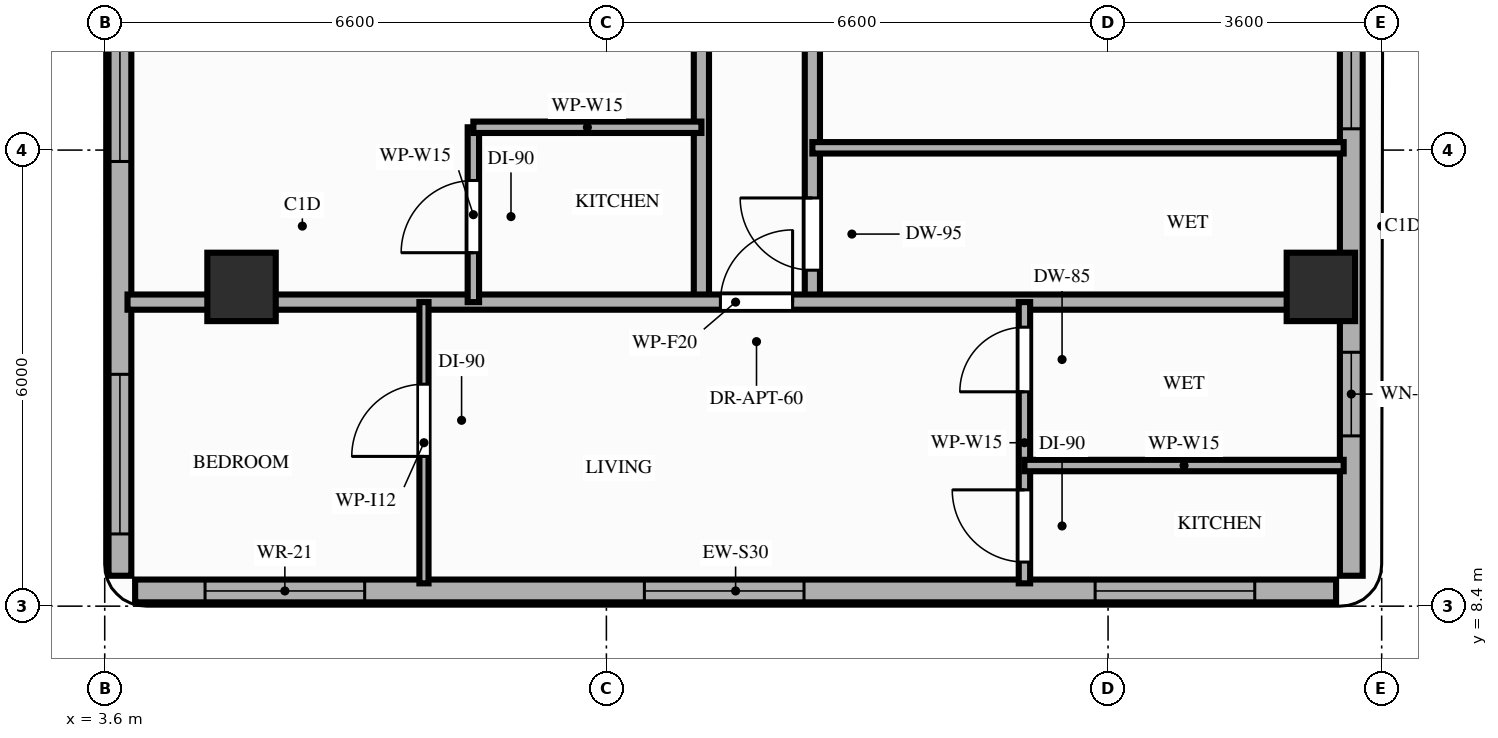
"""IFC4 building model, lengths in metres.
Left out: names, types, materials, properties, quantities, classifications, styles, units other than length and angle.
Written with IfcOpenShell. Run it as: python <this file> out.ifc"""

import sys

from ifc_helpers import new_model, si_unit, direction, frame, frame_2d, origin, origin_2d, place, context, subcontext, project, spatial, rectangle, extrude, element, fill, save


model = new_model("IFC4")
c1 = context("Model", 3, precision=1e-05, world=origin(), true_north=direction((0.0, 1.0)))
c2 = subcontext(c1, "Body", "Model", "MODEL_VIEW")
j1 = project(units=[si_unit("LENGTHUNIT", "METRE"), si_unit("PLANEANGLEUNIT", "RADIAN")], contexts=[c1])
p1 = place(None, origin())
s1 = spatial("IfcSite", under=j1, at=p1, CompositionType="ELEMENT")
p2 = place(p1, origin())
s2 = spatial("IfcBuilding", under=s1, at=p2, CompositionType="ELEMENT")
p3 = place(p2, frame((0.0, 0.0, 185.6)))
s3 = spatial("IfcBuildingStorey", under=s2, at=p3, CompositionType="ELEMENT", Elevation=185.6)
for number, where, z_axis, x_axis in (
    (1, (5.4, 12.6, 0.0), (0.0, 0.0, 1.0), (1.0, 0.0, 0.0)),
    (2, (19.6, 12.6, 0.0), (0.0, 0.0, 1.0), (1.0, 0.0, 0.0)),
):
    element("IfcColumn", number, at=place(p3, frame(where, z_axis=z_axis, x_axis=x_axis)), inside=s3, PredefinedType="COLUMN", context=c2, shape_type="SweptSolid", body=[
        extrude(rectangle(XDim=0.9, YDim=0.9, at=origin_2d()), origin(), (0.0, 0.0, 1.0), 3.2),
    ])
p4 = place(p3, frame((4.0, 8.6, 0.0), z_axis=(0.0, 0.0, 1.0), x_axis=(1.0, 0.0, 0.0)))
e3 = element("IfcWall", 3, at=p4, inside=s3, PredefinedType="STANDARD", context=c2, shape_type="SweptSolid", body=[
    extrude(rectangle(XDim=15.8, YDim=0.3, at=frame_2d((7.9, 0.0))), origin(), (0.0, 0.0, 1.0), 3.02),
])
p5 = place(p4, frame((0.92, 0.0, 0.85)))
e4 = element("IfcOpeningElement", 4, at=p5, cuts=e3, PredefinedType="OPENING", context=c2, shape_type="SweptSolid", body=[
    extrude(rectangle(XDim=2.1, YDim=1.8, at=frame_2d((1.05, 0.9))), frame((0.0, 0.16, 0.0), z_axis=(0.0, -1.0, 0.0), x_axis=(1.0, 0.0, 0.0)), (0.0, 0.0, 1.0), 0.32),
])
p6 = place(p4, frame((6.7, 0.0, 0.85)))
e5 = element("IfcOpeningElement", 5, at=p6, cuts=e3, PredefinedType="OPENING", context=c2, shape_type="SweptSolid", body=[
    extrude(rectangle(XDim=2.1, YDim=1.8, at=frame_2d((1.05, 0.9))), frame((0.0, 0.16, 0.0), z_axis=(0.0, -1.0, 0.0), x_axis=(1.0, 0.0, 0.0)), (0.0, 0.0, 1.0), 0.32),
])
p7 = place(p4, frame((12.63, 0.0, 0.85)))
e6 = element("IfcOpeningElement", 6, at=p7, cuts=e3, PredefinedType="OPENING", context=c2, shape_type="SweptSolid", body=[
    extrude(rectangle(XDim=2.1, YDim=1.8, at=frame_2d((1.05, 0.9))), frame((0.0, 0.16, 0.0), z_axis=(0.0, -1.0, 0.0), x_axis=(1.0, 0.0, 0.0)), (0.0, 0.0, 1.0), 0.32),
])
p8 = place(p3, frame((3.8, 42.1, 0.0), z_axis=(0.0, 0.0, 1.0), x_axis=(0.0, -1.0, 0.0)))
e7 = element("IfcWall", 7, at=p8, inside=s3, PredefinedType="STANDARD", context=c2, shape_type="SweptSolid", body=[
    extrude(rectangle(XDim=33.3, YDim=0.3, at=frame_2d((16.65, 0.0))), origin(), (0.0, 0.0, 1.0), 2.71),
])
p9 = place(p8, frame((21.33, 0.0, 0.0)))
e8 = element("IfcOpeningElement", 8, at=p9, cuts=e7, PredefinedType="OPENING", context=c2, shape_type="SweptSolid", body=[
    extrude(rectangle(XDim=1.4, YDim=2.1, at=frame_2d((0.7, 1.05))), frame((0.0, 0.16, 0.0), z_axis=(0.0, -1.0, 0.0), x_axis=(1.0, 0.0, 0.0)), (0.0, 0.0, 1.0), 0.32),
])
p10 = place(p8, frame((16.2, 0.0, 0.85)))
e9 = element("IfcOpeningElement", 9, at=p10, cuts=e7, PredefinedType="OPENING", context=c2, shape_type="SweptSolid", body=[
    extrude(rectangle(XDim=2.1, YDim=1.61, at=frame_2d((1.05, 0.805))), frame((0.0, 0.16, 0.0), z_axis=(0.0, -1.0, 0.0), x_axis=(1.0, 0.0, 0.0)), (0.0, 0.0, 1.0), 0.32),
])
p11 = place(p8, frame((30.65, 0.0, 0.85)))
e10 = element("IfcOpeningElement", 10, at=p11, cuts=e7, PredefinedType="OPENING", context=c2, shape_type="SweptSolid", body=[
    extrude(rectangle(XDim=2.1, YDim=1.61, at=frame_2d((1.05, 0.805))), frame((0.0, 0.16, 0.0), z_axis=(0.0, -1.0, 0.0), x_axis=(1.0, 0.0, 0.0)), (0.0, 0.0, 1.0), 0.32),
])
p12 = place(p8, frame((25.75, 0.0, 0.85)))
e11 = element("IfcOpeningElement", 11, at=p12, cuts=e7, PredefinedType="OPENING", context=c2, shape_type="SweptSolid", body=[
    extrude(rectangle(XDim=2.1, YDim=1.61, at=frame_2d((1.05, 0.805))), frame((0.0, 0.16, 0.0), z_axis=(0.0, -1.0, 0.0), x_axis=(1.0, 0.0, 0.0)), (0.0, 0.0, 1.0), 0.32),
])
p13 = place(p8, frame((9.75, 0.0, 0.85)))
e12 = element("IfcOpeningElement", 12, at=p13, cuts=e7, PredefinedType="OPENING", context=c2, shape_type="SweptSolid", body=[
    extrude(rectangle(XDim=2.1, YDim=1.61, at=frame_2d((1.05, 0.805))), frame((0.0, 0.16, 0.0), z_axis=(0.0, -1.0, 0.0), x_axis=(1.0, 0.0, 0.0)), (0.0, 0.0, 1.0), 0.32),
])
p14 = place(p8, frame((3.65, 0.0, 0.85)))
e13 = element("IfcOpeningElement", 13, at=p14, cuts=e7, PredefinedType="OPENING", context=c2, shape_type="SweptSolid", body=[
    extrude(rectangle(XDim=2.1, YDim=1.61, at=frame_2d((1.05, 0.805))), frame((0.0, 0.16, 0.0), z_axis=(0.0, -1.0, 0.0), x_axis=(1.0, 0.0, 0.0)), (0.0, 0.0, 1.0), 0.32),
])
p15 = place(p3, frame((20.0, 8.8, 0.0), z_axis=(0.0, 0.0, 1.0), x_axis=(0.0, 1.0, 0.0)))
e14 = element("IfcWall", 14, at=p15, inside=s3, PredefinedType="STANDARD", context=c2, shape_type="SweptSolid", body=[
    extrude(rectangle(XDim=17.55, YDim=0.3, at=frame_2d((8.775, 0.0))), origin(), (0.0, 0.0, 1.0), 2.45),
])
p16 = place(p15, frame((1.84, 0.0, 0.85)))
e15 = element("IfcOpeningElement", 15, at=p16, cuts=e14, PredefinedType="OPENING", context=c2, shape_type="SweptSolid", body=[
    extrude(rectangle(XDim=1.1, YDim=1.35, at=frame_2d((0.55, 0.675))), frame((0.0, 0.16, 0.0), z_axis=(0.0, -1.0, 0.0), x_axis=(1.0, 0.0, 0.0)), (0.0, 0.0, 1.0), 0.32),
])
p17 = place(p15, frame((5.88, 0.0, 0.85)))
e16 = element("IfcOpeningElement", 16, at=p17, cuts=e14, PredefinedType="OPENING", context=c2, shape_type="SweptSolid", body=[
    extrude(rectangle(XDim=2.1, YDim=1.35, at=frame_2d((1.05, 0.675))), frame((0.0, 0.16, 0.0), z_axis=(0.0, -1.0, 0.0), x_axis=(1.0, 0.0, 0.0)), (0.0, 0.0, 1.0), 0.32),
])
p18 = place(p15, frame((10.85, 0.0, 0.85)))
e17 = element("IfcOpeningElement", 17, at=p18, cuts=e14, PredefinedType="OPENING", context=c2, shape_type="SweptSolid", body=[
    extrude(rectangle(XDim=2.1, YDim=1.35, at=frame_2d((1.05, 0.675))), frame((0.0, 0.16, 0.0), z_axis=(0.0, -1.0, 0.0), x_axis=(1.0, 0.0, 0.0)), (0.0, 0.0, 1.0), 0.32),
])
p19 = place(p3, frame((11.45, 12.4, 0.0), z_axis=(0.0, 0.0, 1.0), x_axis=(0.0, 1.0, 0.0)))
e18 = element("IfcWall", 18, at=p19, inside=s3, PredefinedType="PARTITIONING", context=c2, shape_type="SweptSolid", body=[
    extrude(rectangle(XDim=15.7, YDim=0.2, at=frame_2d((7.85, 0.0))), origin(), (0.0, 0.0, 1.0), 2.45),
])
p20 = place(p19, frame((5.27, 0.0, 0.0)))
e19 = element("IfcOpeningElement", 19, at=p20, cuts=e18, PredefinedType="OPENING", context=c2, shape_type="SweptSolid", body=[
    extrude(rectangle(XDim=0.95, YDim=2.15, at=frame_2d((0.475, 1.075))), frame((0.0, 0.11, 0.0), z_axis=(0.0, -1.0, 0.0), x_axis=(1.0, 0.0, 0.0)), (0.0, 0.0, 1.0), 0.22),
])
p21 = place(p3, frame((12.91, 12.4, 0.0), z_axis=(0.0, 0.0, 1.0), x_axis=(0.0, 1.0, 0.0)))
e20 = element("IfcWall", 20, at=p21, inside=s3, PredefinedType="PARTITIONING", context=c2, shape_type="SweptSolid", body=[
    extrude(rectangle(XDim=15.7, YDim=0.2, at=frame_2d((7.85, 0.0))), origin(), (0.0, 0.0, 1.0), 2.45),
])
p22 = place(p21, frame((0.42, 0.0, 0.0)))
e21 = element("IfcOpeningElement", 21, at=p22, cuts=e20, PredefinedType="OPENING", context=c2, shape_type="SweptSolid", body=[
    extrude(rectangle(XDim=0.95, YDim=2.1, at=frame_2d((0.475, 1.05))), frame((0.0, 0.11, 0.0), z_axis=(0.0, -1.0, 0.0), x_axis=(1.0, 0.0, 0.0)), (0.0, 0.0, 1.0), 0.22),
])
p23 = place(p21, frame((5.85, 0.0, 0.0)))
e22 = element("IfcOpeningElement", 22, at=p23, cuts=e20, PredefinedType="OPENING", context=c2, shape_type="SweptSolid", body=[
    extrude(rectangle(XDim=0.95, YDim=2.15, at=frame_2d((0.475, 1.075))), frame((0.0, 0.11, 0.0), z_axis=(0.0, -1.0, 0.0), x_axis=(1.0, 0.0, 0.0)), (0.0, 0.0, 1.0), 0.22),
])
p24 = place(p21, frame((12.69, 0.0, 0.0)))
e23 = element("IfcOpeningElement", 23, at=p24, cuts=e20, PredefinedType="OPENING", context=c2, shape_type="SweptSolid", body=[
    extrude(rectangle(XDim=0.95, YDim=2.15, at=frame_2d((0.475, 1.075))), frame((0.0, 0.11, 0.0), z_axis=(0.0, -1.0, 0.0), x_axis=(1.0, 0.0, 0.0)), (0.0, 0.0, 1.0), 0.22),
])
p25 = place(p3, frame((3.9, 12.4, 0.0), z_axis=(0.0, 0.0, 1.0), x_axis=(1.0, 0.0, 0.0)))
e24 = element("IfcWall", 24, at=p25, inside=s3, PredefinedType="PARTITIONING", context=c2, shape_type="SweptSolid", body=[
    extrude(rectangle(XDim=16.0, YDim=0.2, at=frame_2d((8.0, 0.0))), origin(), (0.0, 0.0, 1.0), 2.45),
])
p26 = place(p25, frame((7.8, 0.0, 0.0)))
e25 = element("IfcOpeningElement", 25, at=p26, cuts=e24, PredefinedType="OPENING", context=c2, shape_type="SweptSolid", body=[
    extrude(rectangle(XDim=0.95, YDim=2.15, at=frame_2d((0.475, 1.075))), frame((0.0, 0.11, 0.0), z_axis=(0.0, -1.0, 0.0), x_axis=(1.0, 0.0, 0.0)), (0.0, 0.0, 1.0), 0.22),
])
p27 = place(p3, frame((7.8, 8.7, 0.0), z_axis=(0.0, 0.0, 1.0), x_axis=(0.0, 1.0, 0.0)))
e26 = element("IfcWall", 26, at=p27, inside=s3, PredefinedType="PARTITIONING", context=c2, shape_type="SweptSolid", body=[
    extrude(rectangle(XDim=3.7, YDim=0.12, at=frame_2d((1.85, 0.0))), origin(), (0.0, 0.0, 1.0), 2.45),
])
p28 = place(p27, frame((1.67, 0.0, 0.0)))
e27 = element("IfcOpeningElement", 27, at=p28, cuts=e26, PredefinedType="OPENING", context=c2, shape_type="SweptSolid", body=[
    extrude(rectangle(XDim=0.95, YDim=2.15, at=frame_2d((0.475, 1.075))), frame((0.0, 0.07, 0.0), z_axis=(0.0, -1.0, 0.0), x_axis=(1.0, 0.0, 0.0)), (0.0, 0.0, 1.0), 0.14),
])
p29 = place(p3, frame((15.7, 8.7, 0.0), z_axis=(0.0, 0.0, 1.0), x_axis=(0.0, 1.0, 0.0)))
e28 = element("IfcWall", 28, at=p29, inside=s3, PredefinedType="PARTITIONING", context=c2, shape_type="SweptSolid", body=[
    extrude(rectangle(XDim=3.7, YDim=0.15, at=frame_2d((1.85, 0.0))), origin(), (0.0, 0.0, 1.0), 2.45),
])
p30 = place(p29, frame((0.28, 0.0, 0.0)))
e29 = element("IfcOpeningElement", 29, at=p30, cuts=e28, PredefinedType="OPENING", context=c2, shape_type="SweptSolid", body=[
    extrude(rectangle(XDim=0.95, YDim=2.15, at=frame_2d((0.475, 1.075))), frame((0.0, 0.085, 0.0), z_axis=(0.0, -1.0, 0.0), x_axis=(1.0, 0.0, 0.0)), (0.0, 0.0, 1.0), 0.17),
])
p31 = place(p29, frame((2.52, 0.0, 0.0)))
e30 = element("IfcOpeningElement", 30, at=p31, cuts=e28, PredefinedType="OPENING", context=c2, shape_type="SweptSolid", body=[
    extrude(rectangle(XDim=0.85, YDim=2.1, at=frame_2d((0.425, 1.05))), frame((0.0, 0.085, 0.0), z_axis=(0.0, -1.0, 0.0), x_axis=(1.0, 0.0, 0.0)), (0.0, 0.0, 1.0), 0.17),
])
p32 = place(p3, frame((15.7, 10.25, 0.0), z_axis=(0.0, 0.0, 1.0), x_axis=(1.0, 0.0, 0.0)))
e31 = element("IfcWall", 31, at=p32, inside=s3, PredefinedType="PARTITIONING", context=c2, shape_type="SweptSolid", body=[
    extrude(rectangle(XDim=4.2, YDim=0.15, at=frame_2d((2.1, 0.0))), origin(), (0.0, 0.0, 1.0), 3.02),
])
p33 = place(p3, frame((8.45, 12.4, 0.0), z_axis=(0.0, 0.0, 1.0), x_axis=(0.0, 1.0, 0.0)))
e32 = element("IfcWall", 32, at=p33, inside=s3, PredefinedType="PARTITIONING", context=c2, shape_type="SweptSolid", body=[
    extrude(rectangle(XDim=2.3, YDim=0.15, at=frame_2d((1.15, 0.0))), origin(), (0.0, 0.0, 1.0), 2.45),
])
p34 = place(p33, frame((0.65, 0.0, 0.0)))
e33 = element("IfcOpeningElement", 33, at=p34, cuts=e32, PredefinedType="OPENING", context=c2, shape_type="SweptSolid", body=[
    extrude(rectangle(XDim=0.95, YDim=2.15, at=frame_2d((0.475, 1.075))), frame((0.0, 0.085, 0.0), z_axis=(0.0, -1.0, 0.0), x_axis=(1.0, 0.0, 0.0)), (0.0, 0.0, 1.0), 0.17),
])
p35 = place(p3, frame((8.45, 14.7, 0.0), z_axis=(0.0, 0.0, 1.0), x_axis=(1.0, 0.0, 0.0)))
e34 = element("IfcWall", 34, at=p35, inside=s3, PredefinedType="PARTITIONING", context=c2, shape_type="SweptSolid", body=[
    extrude(rectangle(XDim=3.0, YDim=0.15, at=frame_2d((1.5, 0.0))), origin(), (0.0, 0.0, 1.0), 3.02),
])
p36 = place(p3, frame((12.91, 14.43, 0.0), z_axis=(0.0, 0.0, 1.0), x_axis=(1.0, 0.0, 0.0)))
e35 = element("IfcWall", 35, at=p36, inside=s3, PredefinedType="PARTITIONING", context=c2, shape_type="SweptSolid", body=[
    extrude(rectangle(XDim=6.99, YDim=0.15, at=frame_2d((3.495, 0.0))), origin(), (0.0, 0.0, 1.0), 2.45),
])
p37 = place(p5, origin())
e36 = element("IfcWindow", 36, at=p37, inside=s3, PartitioningType="SINGLE_PANEL", PredefinedType="WINDOW", context=c2, shape_type="SweptSolid", body=[
    extrude(rectangle(XDim=2.1, YDim=1.8, at=frame_2d((1.05, 0.9))), frame((0.0, 0.03, 0.0), z_axis=(0.0, -1.0, 0.0), x_axis=(1.0, 0.0, 0.0)), (0.0, 0.0, 1.0), 0.06),
])
fill(e4, e36)
p38 = place(p6, origin())
e37 = element("IfcWindow", 37, at=p38, inside=s3, PartitioningType="SINGLE_PANEL", PredefinedType="WINDOW", context=c2, shape_type="SweptSolid", body=[
    extrude(rectangle(XDim=2.1, YDim=1.8, at=frame_2d((1.05, 0.9))), frame((0.0, 0.03, 0.0), z_axis=(0.0, -1.0, 0.0), x_axis=(1.0, 0.0, 0.0)), (0.0, 0.0, 1.0), 0.06),
])
fill(e5, e37)
p39 = place(p7, origin())
e38 = element("IfcWindow", 38, at=p39, inside=s3, PartitioningType="SINGLE_PANEL", PredefinedType="WINDOW", context=c2, shape_type="SweptSolid", body=[
    extrude(rectangle(XDim=2.1, YDim=1.8, at=frame_2d((1.05, 0.9))), frame((0.0, 0.03, 0.0), z_axis=(0.0, -1.0, 0.0), x_axis=(1.0, 0.0, 0.0)), (0.0, 0.0, 1.0), 0.06),
])
fill(e6, e38)
p40 = place(p16, origin())
e39 = element("IfcWindow", 39, at=p40, inside=s3, PartitioningType="SINGLE_PANEL", PredefinedType="WINDOW", context=c2, shape_type="SweptSolid", body=[
    extrude(rectangle(XDim=1.1, YDim=1.35, at=frame_2d((0.55, 0.675))), frame((0.0, 0.03, 0.0), z_axis=(0.0, -1.0, 0.0), x_axis=(1.0, 0.0, 0.0)), (0.0, 0.0, 1.0), 0.06),
])
fill(e15, e39)
p41 = place(p11, origin())
e40 = element("IfcWindow", 40, at=p41, inside=s3, PartitioningType="SINGLE_PANEL", PredefinedType="WINDOW", context=c2, shape_type="SweptSolid", body=[
    extrude(rectangle(XDim=2.1, YDim=1.61, at=frame_2d((1.05, 0.805))), frame((0.0, 0.03, 0.0), z_axis=(0.0, -1.0, 0.0), x_axis=(1.0, 0.0, 0.0)), (0.0, 0.0, 1.0), 0.06),
])
fill(e10, e40)
p42 = place(p12, origin())
e41 = element("IfcWindow", 41, at=p42, inside=s3, PartitioningType="SINGLE_PANEL", PredefinedType="WINDOW", context=c2, shape_type="SweptSolid", body=[
    extrude(rectangle(XDim=2.1, YDim=1.61, at=frame_2d((1.05, 0.805))), frame((0.0, 0.03, 0.0), z_axis=(0.0, -1.0, 0.0), x_axis=(1.0, 0.0, 0.0)), (0.0, 0.0, 1.0), 0.06),
])
fill(e11, e41)
p43 = place(p17, origin())
e42 = element("IfcWindow", 42, at=p43, inside=s3, PartitioningType="SINGLE_PANEL", PredefinedType="WINDOW", context=c2, shape_type="SweptSolid", body=[
    extrude(rectangle(XDim=2.1, YDim=1.35, at=frame_2d((1.05, 0.675))), frame((0.0, 0.03, 0.0), z_axis=(0.0, -1.0, 0.0), x_axis=(1.0, 0.0, 0.0)), (0.0, 0.0, 1.0), 0.06),
])
fill(e16, e42)
p44 = place(p26, origin())
e43 = element("IfcDoor", 43, at=p44, inside=s3, OperationType="SINGLE_SWING_RIGHT", PredefinedType="DOOR", context=c2, shape_type="SweptSolid", body=[
    extrude(rectangle(XDim=0.95, YDim=2.15, at=frame_2d((0.475, 1.075))), frame((0.0, 0.025, 0.0), z_axis=(0.0, -1.0, 0.0), x_axis=(1.0, 0.0, 0.0)), (0.0, 0.0, 1.0), 0.05),
])
fill(e25, e43)
p45 = place(p28, origin())
e44 = element("IfcDoor", 44, at=p45, inside=s3, OperationType="SINGLE_SWING_LEFT", PredefinedType="DOOR", context=c2, shape_type="SweptSolid", body=[
    extrude(rectangle(XDim=0.95, YDim=2.15, at=frame_2d((0.475, 1.075))), frame((0.0, 0.025, 0.0), z_axis=(0.0, -1.0, 0.0), x_axis=(1.0, 0.0, 0.0)), (0.0, 0.0, 1.0), 0.05),
])
fill(e27, e44)
p46 = place(p30, origin())
e45 = element("IfcDoor", 45, at=p46, inside=s3, OperationType="SINGLE_SWING_RIGHT", PredefinedType="DOOR", context=c2, shape_type="SweptSolid", body=[
    extrude(rectangle(XDim=0.95, YDim=2.15, at=frame_2d((0.475, 1.075))), frame((0.0, 0.025, 0.0), z_axis=(0.0, -1.0, 0.0), x_axis=(1.0, 0.0, 0.0)), (0.0, 0.0, 1.0), 0.05),
])
fill(e29, e45)
p47 = place(p31, origin())
e46 = element("IfcDoor", 46, at=p47, inside=s3, OperationType="SINGLE_SWING_LEFT", PredefinedType="DOOR", context=c2, shape_type="SweptSolid", body=[
    extrude(rectangle(XDim=0.85, YDim=2.1, at=frame_2d((0.425, 1.05))), frame((0.0, 0.025, 0.0), z_axis=(0.0, -1.0, 0.0), x_axis=(1.0, 0.0, 0.0)), (0.0, 0.0, 1.0), 0.05),
])
fill(e30, e46)
p48 = place(p34, origin())
e47 = element("IfcDoor", 47, at=p48, inside=s3, OperationType="SINGLE_SWING_LEFT", PredefinedType="DOOR", context=c2, shape_type="SweptSolid", body=[
    extrude(rectangle(XDim=0.95, YDim=2.15, at=frame_2d((0.475, 1.075))), frame((0.0, 0.025, 0.0), z_axis=(0.0, -1.0, 0.0), x_axis=(1.0, 0.0, 0.0)), (0.0, 0.0, 1.0), 0.05),
])
fill(e33, e47)
p49 = place(p22, origin())
e48 = element("IfcDoor", 48, at=p49, inside=s3, OperationType="SINGLE_SWING_RIGHT", PredefinedType="DOOR", context=c2, shape_type="SweptSolid", body=[
    extrude(rectangle(XDim=0.95, YDim=2.1, at=frame_2d((0.475, 1.05))), frame((0.0, 0.025, 0.0), z_axis=(0.0, -1.0, 0.0), x_axis=(1.0, 0.0, 0.0)), (0.0, 0.0, 1.0), 0.05),
])
fill(e21, e48)
save(model, sys.argv[1])
